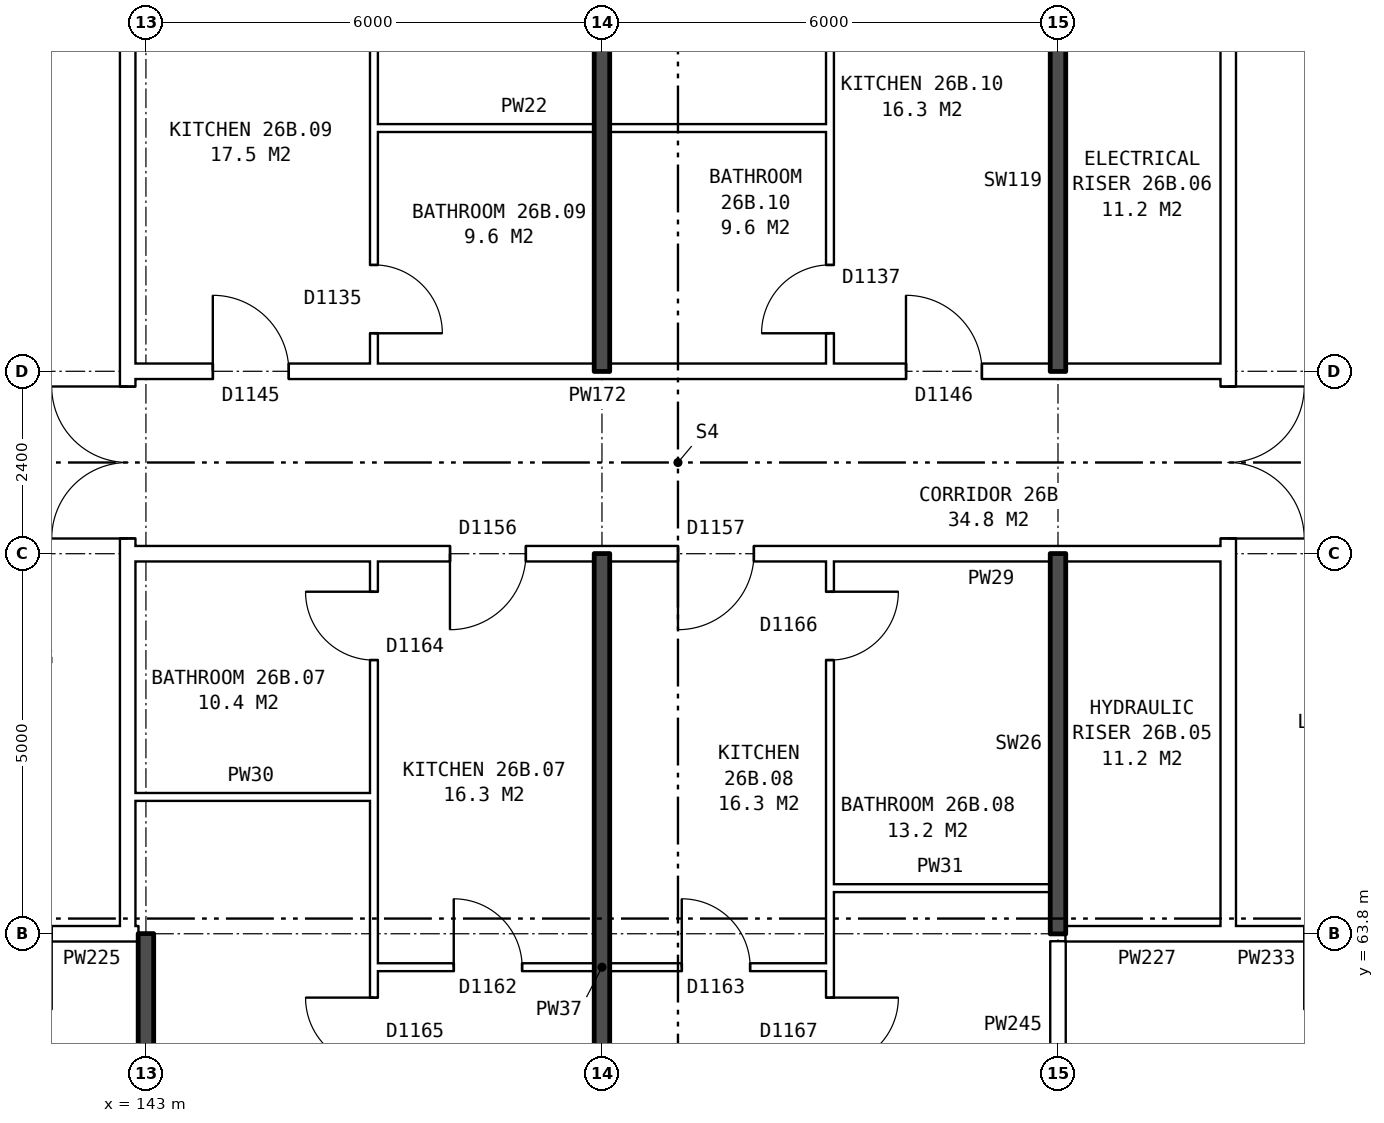
"""IFC4 building model, lengths in metres.
Left out: names, types, materials, properties, quantities, classifications, styles, units other than length and angle.
Written with IfcOpenShell. Run it as: python <this file> out.ifc"""

import sys

from ifc_helpers import new_model, si_unit, direction, frame, frame_2d, origin, place, context, subcontext, project, spatial, rectangle, extrude, element, fill, save


model = new_model("IFC4")
c1 = context("Model", 3, precision=1e-05, world=origin(), true_north=direction((0.0, 1.0)))
c2 = subcontext(c1, "Body", "Model", "MODEL_VIEW")
j1 = project(units=[si_unit("LENGTHUNIT", "METRE"), si_unit("PLANEANGLEUNIT", "RADIAN")], contexts=[c1])
p1 = place(None, origin())
s1 = spatial("IfcSite", under=j1, at=p1, CompositionType="ELEMENT")
p2 = place(p1, origin())
s2 = spatial("IfcBuilding", under=s1, at=p2, CompositionType="ELEMENT")
p3 = place(p2, frame((0.0, 0.0, 96.4)))
s3 = spatial("IfcBuildingStorey", under=s2, at=p3, CompositionType="ELEMENT", Elevation=96.4)
p4 = place(p3, frame((142.76, 63.9, 0.0), z_axis=(0.0, 0.0, 1.0), x_axis=(0.0, 1.0, 0.0)))
e1 = element("IfcWall", 1, at=p4, inside=s3, PredefinedType="PARTITIONING", context=c2, shape_type="SweptSolid", body=[
    extrude(rectangle(XDim=12.2, YDim=0.2, at=frame_2d((6.1, 0.0))), origin(), (0.0, 0.0, 1.0), 2.85),
])
p5 = place(p4, frame((5.1, 0.0, 0.0)))
e2 = element("IfcOpeningElement", 2, at=p5, cuts=e1, PredefinedType="OPENING", context=c2, shape_type="SweptSolid", body=[
    extrude(rectangle(XDim=2.0, YDim=2.1, at=frame_2d((1.0, 1.05))), frame((0.0, 0.11, 0.0), z_axis=(0.0, -1.0, 0.0), x_axis=(1.0, 0.0, 0.0)), (0.0, 0.0, 1.0), 0.22),
])
p6 = place(p3, frame((157.24, 63.9, 0.0), z_axis=(0.0, 0.0, 1.0), x_axis=(0.0, 1.0, 0.0)))
e3 = element("IfcWall", 3, at=p6, inside=s3, PredefinedType="PARTITIONING", context=c2, shape_type="SweptSolid", body=[
    extrude(rectangle(XDim=12.2, YDim=0.2, at=frame_2d((6.1, 0.0))), origin(), (0.0, 0.0, 1.0), 2.85),
])
p7 = place(p6, frame((5.1, 0.0, 0.0)))
e4 = element("IfcOpeningElement", 4, at=p7, cuts=e3, PredefinedType="OPENING", context=c2, shape_type="SweptSolid", body=[
    extrude(rectangle(XDim=2.0, YDim=2.1, at=frame_2d((1.0, 1.05))), frame((0.0, 0.11, 0.0), z_axis=(0.0, -1.0, 0.0), x_axis=(1.0, 0.0, 0.0)), (0.0, 0.0, 1.0), 0.22),
])
p8 = place(p3, frame((146.0, 63.36, 0.0), z_axis=(0.0, 0.0, 1.0), x_axis=(1.0, 0.0, 0.0)))
e5 = element("IfcWall", 5, at=p8, inside=s3, PredefinedType="PARTITIONING", context=c2, shape_type="SweptSolid", body=[
    extrude(rectangle(XDim=6.0, YDim=0.1, at=frame_2d((3.0, 0.0))), origin(), (0.0, 0.0, 1.0), 2.85),
])
p9 = place(p8, frame((1.05, 0.0, 0.0)))
e6 = element("IfcOpeningElement", 6, at=p9, cuts=e5, PredefinedType="OPENING", context=c2, shape_type="SweptSolid", body=[
    extrude(rectangle(XDim=0.9, YDim=2.1, at=frame_2d((0.45, 1.05))), frame((0.0, 0.06, 0.0), z_axis=(0.0, -1.0, 0.0), x_axis=(1.0, 0.0, 0.0)), (0.0, 0.0, 1.0), 0.12),
])
p10 = place(p8, frame((4.05, 0.0, 0.0)))
e7 = element("IfcOpeningElement", 7, at=p10, cuts=e5, PredefinedType="OPENING", context=c2, shape_type="SweptSolid", body=[
    extrude(rectangle(XDim=0.9, YDim=2.1, at=frame_2d((0.45, 1.05))), frame((0.0, 0.06, 0.0), z_axis=(0.0, -1.0, 0.0), x_axis=(1.0, 0.0, 0.0)), (0.0, 0.0, 1.0), 0.12),
])
p11 = place(p3, frame((139.76, 63.8, 0.0), z_axis=(0.0, 0.0, 1.0), x_axis=(1.0, 0.0, 0.0)))
e8 = element("IfcWall", 8, at=p11, inside=s3, PredefinedType="PARTITIONING", context=c2, shape_type="SweptSolid", body=[
    extrude(rectangle(XDim=3.0, YDim=0.2, at=frame_2d((1.5, 0.0))), origin(), (0.0, 0.0, 1.0), 2.85),
])
p12 = place(p11, frame((1.0, 0.0, 0.0)))
e9 = element("IfcOpeningElement", 9, at=p12, cuts=e8, PredefinedType="OPENING", context=c2, shape_type="SweptSolid", body=[
    extrude(rectangle(XDim=1.0, YDim=2.1, at=frame_2d((0.5, 1.05))), frame((0.0, 0.11, 0.0), z_axis=(0.0, -1.0, 0.0), x_axis=(1.0, 0.0, 0.0)), (0.0, 0.0, 1.0), 0.22),
])
p13 = place(p3, frame((142.76, 63.8, 0.0), z_axis=(0.0, 0.0, 1.0), x_axis=(1.0, 0.0, 0.0)))
e10 = element("IfcWall", 10, at=p13, inside=s3, PredefinedType="PARTITIONING", context=c2, shape_type="SweptSolid", body=[
    extrude(rectangle(XDim=0.14, YDim=0.2, at=frame_2d((0.07, 0.0))), origin(), (0.0, 0.0, 1.0), 2.85),
])
p14 = place(p3, frame((155.1, 63.8, 0.0), z_axis=(0.0, 0.0, 1.0), x_axis=(1.0, 0.0, 0.0)))
e11 = element("IfcWall", 11, at=p14, inside=s3, PredefinedType="PARTITIONING", context=c2, shape_type="SweptSolid", body=[
    extrude(rectangle(XDim=2.14, YDim=0.2, at=frame_2d((1.07, 0.0))), origin(), (0.0, 0.0, 1.0), 2.85),
])
p15 = place(p3, frame((157.24, 63.8, 0.0), z_axis=(0.0, 0.0, 1.0), x_axis=(1.0, 0.0, 0.0)))
e12 = element("IfcWall", 12, at=p15, inside=s3, PredefinedType="PARTITIONING", context=c2, shape_type="SweptSolid", body=[
    extrude(rectangle(XDim=3.0, YDim=0.2, at=frame_2d((1.5, 0.0))), origin(), (0.0, 0.0, 1.0), 2.85),
])
p16 = place(p15, frame((1.0, 0.0, 0.0)))
e13 = element("IfcOpeningElement", 13, at=p16, cuts=e12, PredefinedType="OPENING", context=c2, shape_type="SweptSolid", body=[
    extrude(rectangle(XDim=1.0, YDim=2.1, at=frame_2d((0.5, 1.05))), frame((0.0, 0.11, 0.0), z_axis=(0.0, -1.0, 0.0), x_axis=(1.0, 0.0, 0.0)), (0.0, 0.0, 1.0), 0.22),
])
p17 = place(p3, frame((152.0, 64.4, 0.0), z_axis=(0.0, 0.0, 1.0), x_axis=(1.0, 0.0, 0.0)))
e14 = element("IfcWall", 14, at=p17, inside=s3, PredefinedType="PARTITIONING", context=c2, shape_type="SweptSolid", body=[
    extrude(rectangle(XDim=2.9, YDim=0.1, at=frame_2d((1.45, 0.0))), origin(), (0.0, 0.0, 1.0), 2.85),
])
p18 = place(p3, frame((142.76, 65.6, 0.0), z_axis=(0.0, 0.0, 1.0), x_axis=(1.0, 0.0, 0.0)))
e15 = element("IfcWall", 15, at=p18, inside=s3, PredefinedType="PARTITIONING", context=c2, shape_type="SweptSolid", body=[
    extrude(rectangle(XDim=3.24, YDim=0.1, at=frame_2d((1.62, 0.0))), origin(), (0.0, 0.0, 1.0), 2.85),
])
p19 = place(p3, frame((142.76, 68.8, 0.0), z_axis=(0.0, 0.0, 1.0), x_axis=(1.0, 0.0, 0.0)))
e16 = element("IfcWall", 16, at=p19, inside=s3, PredefinedType="PARTITIONING", context=c2, shape_type="SweptSolid", body=[
    extrude(rectangle(XDim=14.48, YDim=0.2, at=frame_2d((7.24, 0.0))), origin(), (0.0, 0.0, 1.0), 2.85),
])
p20 = place(p19, frame((4.24, 0.0, 0.0)))
e17 = element("IfcOpeningElement", 17, at=p20, cuts=e16, PredefinedType="OPENING", context=c2, shape_type="SweptSolid", body=[
    extrude(rectangle(XDim=1.0, YDim=2.1, at=frame_2d((0.5, 1.05))), frame((0.0, 0.11, 0.0), z_axis=(0.0, -1.0, 0.0), x_axis=(1.0, 0.0, 0.0)), (0.0, 0.0, 1.0), 0.22),
])
p21 = place(p19, frame((7.24, 0.0, 0.0)))
e18 = element("IfcOpeningElement", 18, at=p21, cuts=e16, PredefinedType="OPENING", context=c2, shape_type="SweptSolid", body=[
    extrude(rectangle(XDim=1.0, YDim=2.1, at=frame_2d((0.5, 1.05))), frame((0.0, 0.11, 0.0), z_axis=(0.0, -1.0, 0.0), x_axis=(1.0, 0.0, 0.0)), (0.0, 0.0, 1.0), 0.22),
])
p22 = place(p3, frame((142.76, 71.2, 0.0), z_axis=(0.0, 0.0, 1.0), x_axis=(1.0, 0.0, 0.0)))
e19 = element("IfcWall", 19, at=p22, inside=s3, PredefinedType="PARTITIONING", context=c2, shape_type="SweptSolid", body=[
    extrude(rectangle(XDim=14.48, YDim=0.2, at=frame_2d((7.24, 0.0))), origin(), (0.0, 0.0, 1.0), 2.85),
])
p23 = place(p22, frame((1.12, 0.0, 0.0)))
e20 = element("IfcOpeningElement", 20, at=p23, cuts=e19, PredefinedType="OPENING", context=c2, shape_type="SweptSolid", body=[
    extrude(rectangle(XDim=1.0, YDim=2.1, at=frame_2d((0.5, 1.05))), frame((0.0, 0.11, 0.0), z_axis=(0.0, -1.0, 0.0), x_axis=(1.0, 0.0, 0.0)), (0.0, 0.0, 1.0), 0.22),
])
p24 = place(p22, frame((10.24, 0.0, 0.0)))
e21 = element("IfcOpeningElement", 21, at=p24, cuts=e19, PredefinedType="OPENING", context=c2, shape_type="SweptSolid", body=[
    extrude(rectangle(XDim=1.0, YDim=2.1, at=frame_2d((0.5, 1.05))), frame((0.0, 0.11, 0.0), z_axis=(0.0, -1.0, 0.0), x_axis=(1.0, 0.0, 0.0)), (0.0, 0.0, 1.0), 0.22),
])
p25 = place(p3, frame((146.0, 74.4, 0.0), z_axis=(0.0, 0.0, 1.0), x_axis=(1.0, 0.0, 0.0)))
e22 = element("IfcWall", 22, at=p25, inside=s3, PredefinedType="PARTITIONING", context=c2, shape_type="SweptSolid", body=[
    extrude(rectangle(XDim=6.0, YDim=0.1, at=frame_2d((3.0, 0.0))), origin(), (0.0, 0.0, 1.0), 2.85),
])
p26 = place(p3, frame((143.0, 54.36, 0.0), z_axis=(0.0, 0.0, 1.0), x_axis=(0.0, 1.0, 0.0)))
e23 = element("IfcWall", 23, at=p26, inside=s3, PredefinedType="SOLIDWALL", context=c2, shape_type="SweptSolid", body=[
    extrude(rectangle(XDim=9.44, YDim=0.2, at=frame_2d((4.72, 0.0))), origin(), (0.0, 0.0, 1.0), 2.85),
])
p27 = place(p3, frame((146.0, 54.36, 0.0), z_axis=(0.0, 0.0, 1.0), x_axis=(0.0, 1.0, 0.0)))
e24 = element("IfcWall", 24, at=p27, inside=s3, PredefinedType="PARTITIONING", context=c2, shape_type="SweptSolid", body=[
    extrude(rectangle(XDim=14.34, YDim=0.1, at=frame_2d((7.17, 0.0))), origin(), (0.0, 0.0, 1.0), 2.85),
])
p28 = place(p27, frame((7.7, 0.0, 0.0)))
e25 = element("IfcOpeningElement", 25, at=p28, cuts=e24, PredefinedType="OPENING", context=c2, shape_type="SweptSolid", body=[
    extrude(rectangle(XDim=0.9, YDim=2.1, at=frame_2d((0.45, 1.05))), frame((0.0, 0.06, 0.0), z_axis=(0.0, -1.0, 0.0), x_axis=(1.0, 0.0, 0.0)), (0.0, 0.0, 1.0), 0.12),
])
p29 = place(p27, frame((13.04, 0.0, 0.0)))
e26 = element("IfcOpeningElement", 26, at=p29, cuts=e24, PredefinedType="OPENING", context=c2, shape_type="SweptSolid", body=[
    extrude(rectangle(XDim=0.9, YDim=2.1, at=frame_2d((0.45, 1.05))), frame((0.0, 0.06, 0.0), z_axis=(0.0, -1.0, 0.0), x_axis=(1.0, 0.0, 0.0)), (0.0, 0.0, 1.0), 0.12),
])
p30 = place(p3, frame((146.0, 71.3, 0.0), z_axis=(0.0, 0.0, 1.0), x_axis=(0.0, 1.0, 0.0)))
e27 = element("IfcWall", 27, at=p30, inside=s3, PredefinedType="PARTITIONING", context=c2, shape_type="SweptSolid", body=[
    extrude(rectangle(XDim=14.34, YDim=0.1, at=frame_2d((7.17, 0.0))), origin(), (0.0, 0.0, 1.0), 2.85),
])
p31 = place(p30, frame((5.74, 0.0, 0.0)))
e28 = element("IfcOpeningElement", 28, at=p31, cuts=e27, PredefinedType="OPENING", context=c2, shape_type="SweptSolid", body=[
    extrude(rectangle(XDim=0.9, YDim=2.1, at=frame_2d((0.45, 1.05))), frame((0.0, 0.06, 0.0), z_axis=(0.0, -1.0, 0.0), x_axis=(1.0, 0.0, 0.0)), (0.0, 0.0, 1.0), 0.12),
])
p32 = place(p30, frame((0.4, 0.0, 0.0)))
e29 = element("IfcOpeningElement", 29, at=p32, cuts=e27, PredefinedType="OPENING", context=c2, shape_type="SweptSolid", body=[
    extrude(rectangle(XDim=0.9, YDim=2.1, at=frame_2d((0.45, 1.05))), frame((0.0, 0.06, 0.0), z_axis=(0.0, -1.0, 0.0), x_axis=(1.0, 0.0, 0.0)), (0.0, 0.0, 1.0), 0.12),
])
for number, where, z_axis, x_axis in (
    (30, (149.0, 54.36, 0.0), (0.0, 0.0, 1.0), (0.0, 1.0, 0.0)),
    (31, (149.0, 71.2, 0.0), (0.0, 0.0, 1.0), (0.0, 1.0, 0.0)),
):
    element("IfcWall", number, at=place(p3, frame(where, z_axis=z_axis, x_axis=x_axis)), inside=s3, PredefinedType="SOLIDWALL", context=c2, shape_type="SweptSolid", body=[
        extrude(rectangle(XDim=14.44, YDim=0.2, at=frame_2d((7.22, 0.0))), origin(), (0.0, 0.0, 1.0), 2.85),
    ])
p33 = place(p3, frame((152.0, 54.36, 0.0), z_axis=(0.0, 0.0, 1.0), x_axis=(0.0, 1.0, 0.0)))
e32 = element("IfcWall", 32, at=p33, inside=s3, PredefinedType="PARTITIONING", context=c2, shape_type="SweptSolid", body=[
    extrude(rectangle(XDim=14.34, YDim=0.1, at=frame_2d((7.17, 0.0))), origin(), (0.0, 0.0, 1.0), 2.85),
])
p34 = place(p33, frame((7.7, 0.0, 0.0)))
e33 = element("IfcOpeningElement", 33, at=p34, cuts=e32, PredefinedType="OPENING", context=c2, shape_type="SweptSolid", body=[
    extrude(rectangle(XDim=0.9, YDim=2.1, at=frame_2d((0.45, 1.05))), frame((0.0, 0.06, 0.0), z_axis=(0.0, -1.0, 0.0), x_axis=(1.0, 0.0, 0.0)), (0.0, 0.0, 1.0), 0.12),
])
p35 = place(p33, frame((13.04, 0.0, 0.0)))
e34 = element("IfcOpeningElement", 34, at=p35, cuts=e32, PredefinedType="OPENING", context=c2, shape_type="SweptSolid", body=[
    extrude(rectangle(XDim=0.9, YDim=2.1, at=frame_2d((0.45, 1.05))), frame((0.0, 0.06, 0.0), z_axis=(0.0, -1.0, 0.0), x_axis=(1.0, 0.0, 0.0)), (0.0, 0.0, 1.0), 0.12),
])
p36 = place(p3, frame((152.0, 71.3, 0.0), z_axis=(0.0, 0.0, 1.0), x_axis=(0.0, 1.0, 0.0)))
e35 = element("IfcWall", 35, at=p36, inside=s3, PredefinedType="PARTITIONING", context=c2, shape_type="SweptSolid", body=[
    extrude(rectangle(XDim=14.34, YDim=0.1, at=frame_2d((7.17, 0.0))), origin(), (0.0, 0.0, 1.0), 2.85),
])
p37 = place(p36, frame((5.74, 0.0, 0.0)))
e36 = element("IfcOpeningElement", 36, at=p37, cuts=e35, PredefinedType="OPENING", context=c2, shape_type="SweptSolid", body=[
    extrude(rectangle(XDim=0.9, YDim=2.1, at=frame_2d((0.45, 1.05))), frame((0.0, 0.06, 0.0), z_axis=(0.0, -1.0, 0.0), x_axis=(1.0, 0.0, 0.0)), (0.0, 0.0, 1.0), 0.12),
])
p38 = place(p36, frame((0.4, 0.0, 0.0)))
e37 = element("IfcOpeningElement", 37, at=p38, cuts=e35, PredefinedType="OPENING", context=c2, shape_type="SweptSolid", body=[
    extrude(rectangle(XDim=0.9, YDim=2.1, at=frame_2d((0.45, 1.05))), frame((0.0, 0.06, 0.0), z_axis=(0.0, -1.0, 0.0), x_axis=(1.0, 0.0, 0.0)), (0.0, 0.0, 1.0), 0.12),
])
p39 = place(p3, frame((155.0, 61.5, 0.0), z_axis=(0.0, 0.0, 1.0), x_axis=(0.0, 1.0, 0.0)))
e38 = element("IfcWall", 38, at=p39, inside=s3, PredefinedType="PARTITIONING", context=c2, shape_type="SweptSolid", body=[
    extrude(rectangle(XDim=2.2, YDim=0.2, at=frame_2d((1.1, 0.0))), origin(), (0.0, 0.0, 1.0), 2.85),
])
for number, where, z_axis, x_axis in (
    (39, (155.0, 63.8, 0.0), (0.0, 0.0, 1.0), (0.0, 1.0, 0.0)),
    (40, (155.0, 71.2, 0.0), (0.0, 0.0, 1.0), (0.0, 1.0, 0.0)),
):
    element("IfcWall", number, at=place(p3, frame(where, z_axis=z_axis, x_axis=x_axis)), inside=s3, PredefinedType="SOLIDWALL", context=c2, shape_type="SweptSolid", body=[
        extrude(rectangle(XDim=5.0, YDim=0.2, at=frame_2d((2.5, 0.0))), origin(), (0.0, 0.0, 1.0), 2.85),
    ])
p40 = place(p5, origin())
e41 = element("IfcDoor", 41, at=p40, inside=s3, OperationType="DOUBLE_DOOR_SINGLE_SWING", PredefinedType="DOOR", context=c2, shape_type="SweptSolid", body=[
    extrude(rectangle(XDim=2.0, YDim=2.1, at=frame_2d((1.0, 1.05))), frame((0.0, 0.025, 0.0), z_axis=(0.0, -1.0, 0.0), x_axis=(1.0, 0.0, 0.0)), (0.0, 0.0, 1.0), 0.05),
])
fill(e2, e41)
p41 = place(p7, frame((2.0, 0.0, 0.0), z_axis=(0.0, 0.0, 1.0), x_axis=(-1.0, 0.0, 0.0)))
e42 = element("IfcDoor", 42, at=p41, inside=s3, OperationType="DOUBLE_DOOR_SINGLE_SWING", PredefinedType="DOOR", context=c2, shape_type="SweptSolid", body=[
    extrude(rectangle(XDim=2.0, YDim=2.1, at=frame_2d((1.0, 1.05))), frame((0.0, 0.025, 0.0), z_axis=(0.0, -1.0, 0.0), x_axis=(1.0, 0.0, 0.0)), (0.0, 0.0, 1.0), 0.05),
])
fill(e4, e42)
p42 = place(p28, origin())
e43 = element("IfcDoor", 43, at=p42, inside=s3, OperationType="SINGLE_SWING_RIGHT", PredefinedType="DOOR", context=c2, shape_type="SweptSolid", body=[
    extrude(rectangle(XDim=0.9, YDim=2.1, at=frame_2d((0.45, 1.05))), frame((0.0, 0.025, 0.0), z_axis=(0.0, -1.0, 0.0), x_axis=(1.0, 0.0, 0.0)), (0.0, 0.0, 1.0), 0.05),
])
fill(e25, e43)
p43 = place(p20, frame((1.0, 0.0, 0.0), z_axis=(0.0, 0.0, 1.0), x_axis=(-1.0, 0.0, 0.0)))
e44 = element("IfcDoor", 44, at=p43, inside=s3, OperationType="SINGLE_SWING_RIGHT", PredefinedType="DOOR", context=c2, shape_type="SweptSolid", body=[
    extrude(rectangle(XDim=1.0, YDim=2.1, at=frame_2d((0.5, 1.05))), frame((0.0, 0.025, 0.0), z_axis=(0.0, -1.0, 0.0), x_axis=(1.0, 0.0, 0.0)), (0.0, 0.0, 1.0), 0.05),
])
fill(e17, e44)
p44 = place(p9, origin())
e45 = element("IfcDoor", 45, at=p44, inside=s3, OperationType="SINGLE_SWING_LEFT", PredefinedType="DOOR", context=c2, shape_type="SweptSolid", body=[
    extrude(rectangle(XDim=0.9, YDim=2.1, at=frame_2d((0.45, 1.05))), frame((0.0, 0.025, 0.0), z_axis=(0.0, -1.0, 0.0), x_axis=(1.0, 0.0, 0.0)), (0.0, 0.0, 1.0), 0.05),
])
fill(e6, e45)
p45 = place(p29, origin())
e46 = element("IfcDoor", 46, at=p45, inside=s3, OperationType="SINGLE_SWING_RIGHT", PredefinedType="DOOR", context=c2, shape_type="SweptSolid", body=[
    extrude(rectangle(XDim=0.9, YDim=2.1, at=frame_2d((0.45, 1.05))), frame((0.0, 0.025, 0.0), z_axis=(0.0, -1.0, 0.0), x_axis=(1.0, 0.0, 0.0)), (0.0, 0.0, 1.0), 0.05),
])
fill(e26, e46)
p46 = place(p34, frame((0.9, 0.0, 0.0), z_axis=(0.0, 0.0, 1.0), x_axis=(-1.0, 0.0, 0.0)))
e47 = element("IfcDoor", 47, at=p46, inside=s3, OperationType="SINGLE_SWING_LEFT", PredefinedType="DOOR", context=c2, shape_type="SweptSolid", body=[
    extrude(rectangle(XDim=0.9, YDim=2.1, at=frame_2d((0.45, 1.05))), frame((0.0, 0.025, 0.0), z_axis=(0.0, -1.0, 0.0), x_axis=(1.0, 0.0, 0.0)), (0.0, 0.0, 1.0), 0.05),
])
fill(e33, e47)
p47 = place(p21, frame((1.0, 0.0, 0.0), z_axis=(0.0, 0.0, 1.0), x_axis=(-1.0, 0.0, 0.0)))
e48 = element("IfcDoor", 48, at=p47, inside=s3, OperationType="SINGLE_SWING_RIGHT", PredefinedType="DOOR", context=c2, shape_type="SweptSolid", body=[
    extrude(rectangle(XDim=1.0, YDim=2.1, at=frame_2d((0.5, 1.05))), frame((0.0, 0.025, 0.0), z_axis=(0.0, -1.0, 0.0), x_axis=(1.0, 0.0, 0.0)), (0.0, 0.0, 1.0), 0.05),
])
fill(e18, e48)
p48 = place(p10, origin())
e49 = element("IfcDoor", 49, at=p48, inside=s3, OperationType="SINGLE_SWING_LEFT", PredefinedType="DOOR", context=c2, shape_type="SweptSolid", body=[
    extrude(rectangle(XDim=0.9, YDim=2.1, at=frame_2d((0.45, 1.05))), frame((0.0, 0.025, 0.0), z_axis=(0.0, -1.0, 0.0), x_axis=(1.0, 0.0, 0.0)), (0.0, 0.0, 1.0), 0.05),
])
fill(e7, e49)
p49 = place(p35, frame((0.9, 0.0, 0.0), z_axis=(0.0, 0.0, 1.0), x_axis=(-1.0, 0.0, 0.0)))
e50 = element("IfcDoor", 50, at=p49, inside=s3, OperationType="SINGLE_SWING_LEFT", PredefinedType="DOOR", context=c2, shape_type="SweptSolid", body=[
    extrude(rectangle(XDim=0.9, YDim=2.1, at=frame_2d((0.45, 1.05))), frame((0.0, 0.025, 0.0), z_axis=(0.0, -1.0, 0.0), x_axis=(1.0, 0.0, 0.0)), (0.0, 0.0, 1.0), 0.05),
])
fill(e34, e50)
p50 = place(p23, origin())
e51 = element("IfcDoor", 51, at=p50, inside=s3, OperationType="SINGLE_SWING_LEFT", PredefinedType="DOOR", context=c2, shape_type="SweptSolid", body=[
    extrude(rectangle(XDim=1.0, YDim=2.1, at=frame_2d((0.5, 1.05))), frame((0.0, 0.025, 0.0), z_axis=(0.0, -1.0, 0.0), x_axis=(1.0, 0.0, 0.0)), (0.0, 0.0, 1.0), 0.05),
])
fill(e20, e51)
p51 = place(p32, frame((0.9, 0.0, 0.0), z_axis=(0.0, 0.0, 1.0), x_axis=(-1.0, 0.0, 0.0)))
e52 = element("IfcDoor", 52, at=p51, inside=s3, OperationType="SINGLE_SWING_RIGHT", PredefinedType="DOOR", context=c2, shape_type="SweptSolid", body=[
    extrude(rectangle(XDim=0.9, YDim=2.1, at=frame_2d((0.45, 1.05))), frame((0.0, 0.025, 0.0), z_axis=(0.0, -1.0, 0.0), x_axis=(1.0, 0.0, 0.0)), (0.0, 0.0, 1.0), 0.05),
])
fill(e29, e52)
p52 = place(p24, origin())
e53 = element("IfcDoor", 53, at=p52, inside=s3, OperationType="SINGLE_SWING_LEFT", PredefinedType="DOOR", context=c2, shape_type="SweptSolid", body=[
    extrude(rectangle(XDim=1.0, YDim=2.1, at=frame_2d((0.5, 1.05))), frame((0.0, 0.025, 0.0), z_axis=(0.0, -1.0, 0.0), x_axis=(1.0, 0.0, 0.0)), (0.0, 0.0, 1.0), 0.05),
])
fill(e21, e53)
p53 = place(p38, origin())
e54 = element("IfcDoor", 54, at=p53, inside=s3, OperationType="SINGLE_SWING_LEFT", PredefinedType="DOOR", context=c2, shape_type="SweptSolid", body=[
    extrude(rectangle(XDim=0.9, YDim=2.1, at=frame_2d((0.45, 1.05))), frame((0.0, 0.025, 0.0), z_axis=(0.0, -1.0, 0.0), x_axis=(1.0, 0.0, 0.0)), (0.0, 0.0, 1.0), 0.05),
])
fill(e37, e54)
save(model, sys.argv[1])
